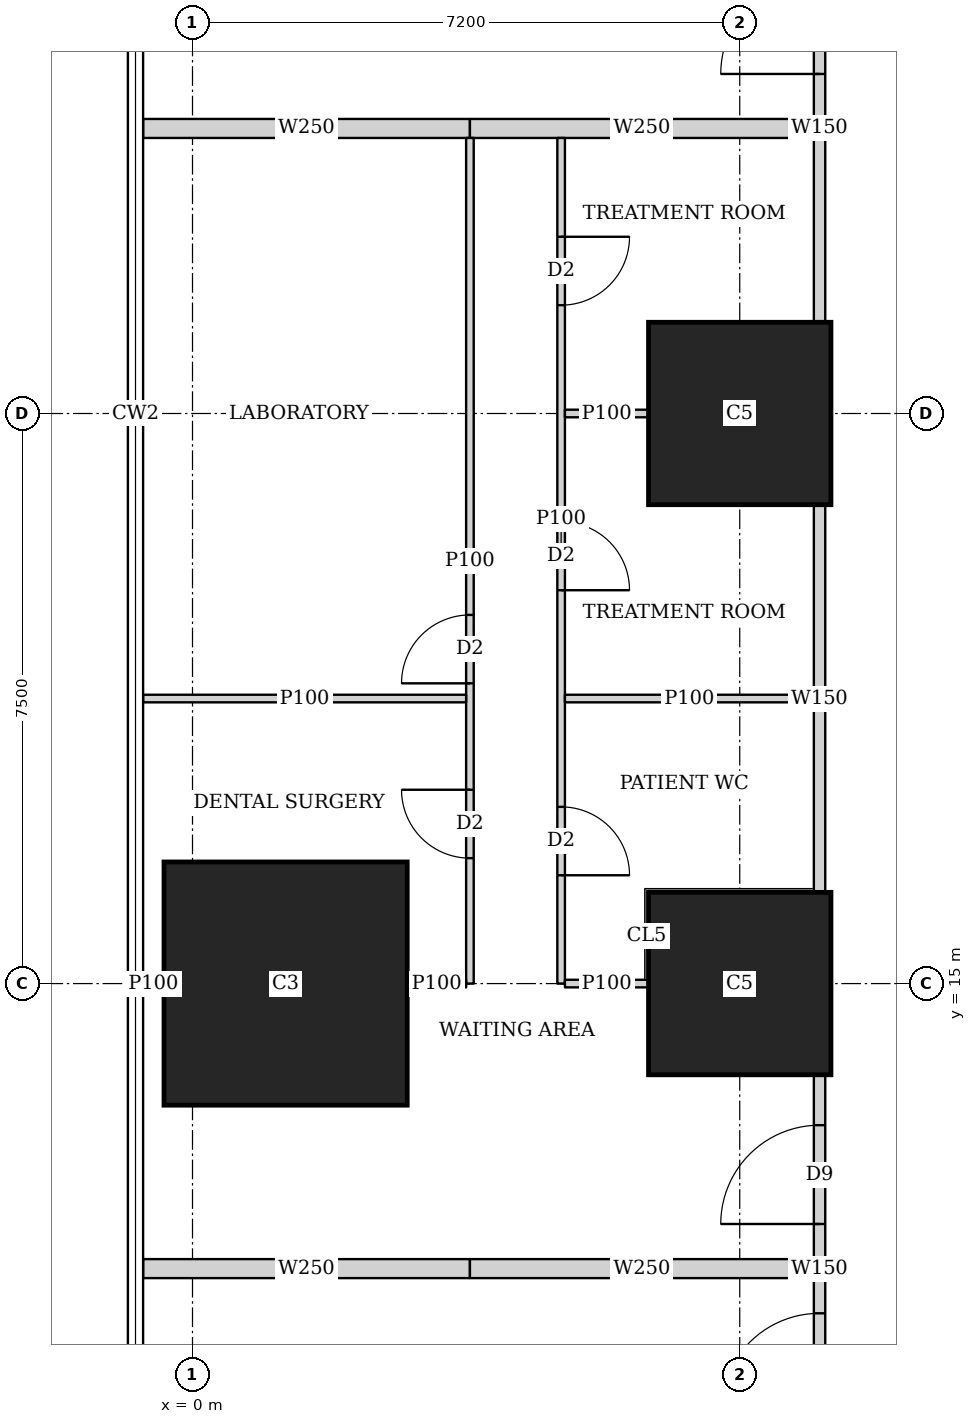
"""IFC4 building model, lengths in metres.
Left out: names, types, materials, properties, quantities, classifications, styles, units other than length and angle.
Written with IfcOpenShell. Run it as: python <this file> out.ifc"""

import sys

from ifc_helpers import new_model, si_unit, direction, frame, frame_2d, origin, origin_2d, place, context, subcontext, project, spatial, rectangle, extrude, element, fill, save


model = new_model("IFC4")
c1 = context("Model", 3, precision=1e-05, world=origin(), true_north=direction((0.0, 1.0)))
c2 = subcontext(c1, "Body", "Model", "MODEL_VIEW")
j1 = project(units=[si_unit("LENGTHUNIT", "METRE"), si_unit("PLANEANGLEUNIT", "RADIAN")], contexts=[c1])
p1 = place(None, origin())
s1 = spatial("IfcSite", under=j1, at=p1, CompositionType="ELEMENT")
p2 = place(p1, origin())
s2 = spatial("IfcBuilding", under=s1, at=p2, CompositionType="ELEMENT")
p3 = place(p2, frame((0.0, 0.0, 10.1)))
s3 = spatial("IfcBuildingStorey", under=s2, at=p3, CompositionType="ELEMENT", Elevation=10.1)
p4 = place(p3, frame((1.225, 15.0, 0.0), z_axis=(0.0, 0.0, 1.0), x_axis=(1.0, 0.0, 0.0)))
e1 = element("IfcColumn", 1, at=p4, inside=s3, PredefinedType="COLUMN", context=c2, shape_type="SweptSolid", body=[
    extrude(rectangle(XDim=3.2, YDim=3.2, at=origin_2d()), origin(), (0.0, 0.0, 1.0), 4.5),
])
for number, where, z_axis, x_axis in (
    (2, (7.2, 15.0, 0.0), (0.0, 0.0, 1.0), (1.0, 0.0, 0.0)),
    (3, (7.2, 22.5, 0.0), (0.0, 0.0, 1.0), (1.0, 0.0, 0.0)),
):
    element("IfcColumn", number, at=place(p3, frame(where, z_axis=z_axis, x_axis=x_axis)), inside=s3, PredefinedType="COLUMN", context=c2, shape_type="SweptSolid", body=[
        extrude(rectangle(XDim=2.4, YDim=2.4, at=origin_2d()), origin(), (0.0, 0.0, 1.0), 4.5),
    ])
p5 = place(p3, frame((8.25, 8.701, 0.0), z_axis=(0.0, 0.0, 1.0), x_axis=(0.0, 1.0, 0.0)))
e4 = element("IfcWall", 4, at=p5, inside=s3, PredefinedType="SOLIDWALL", context=c2, shape_type="SweptSolid", body=[
    extrude(rectangle(XDim=5.098, YDim=0.15, at=frame_2d((2.549, 0.0))), origin(), (0.0, 0.0, 1.0), 4.2),
])
p6 = place(p5, frame((0.661, 0.0, 0.0)))
e5 = element("IfcOpeningElement", 5, at=p6, cuts=e4, PredefinedType="OPENING", context=c2, shape_type="SweptSolid", body=[
    extrude(rectangle(XDim=1.3, YDim=2.1, at=frame_2d((0.65, 1.05))), frame((0.0, 0.085, 0.0), z_axis=(0.0, -1.0, 0.0), x_axis=(1.0, 0.0, 0.0)), (0.0, 0.0, 1.0), 0.17),
])
p7 = place(p5, frame((3.136, 0.0, 0.0)))
e6 = element("IfcOpeningElement", 6, at=p7, cuts=e4, PredefinedType="OPENING", context=c2, shape_type="SweptSolid", body=[
    extrude(rectangle(XDim=1.3, YDim=2.1, at=frame_2d((0.65, 1.05))), frame((0.0, 0.085, 0.0), z_axis=(0.0, -1.0, 0.0), x_axis=(1.0, 0.0, 0.0)), (0.0, 0.0, 1.0), 0.17),
])
p8 = place(p3, frame((8.25, 16.201, 0.0), z_axis=(0.0, 0.0, 1.0), x_axis=(0.0, 1.0, 0.0)))
e7 = element("IfcWall", 7, at=p8, inside=s3, PredefinedType="SOLIDWALL", context=c2, shape_type="SweptSolid", body=[
    extrude(rectangle(XDim=5.098, YDim=0.15, at=frame_2d((2.549, 0.0))), origin(), (0.0, 0.0, 1.0), 4.2),
])
p9 = place(p3, frame((8.25, 23.701, 0.0), z_axis=(0.0, 0.0, 1.0), x_axis=(0.0, 1.0, 0.0)))
e8 = element("IfcWall", 8, at=p9, inside=s3, PredefinedType="SOLIDWALL", context=c2, shape_type="SweptSolid", body=[
    extrude(rectangle(XDim=5.098, YDim=0.15, at=frame_2d((2.549, 0.0))), origin(), (0.0, 0.0, 1.0), 4.2),
])
p10 = place(p9, frame((3.266, 0.0, 0.0)))
e9 = element("IfcOpeningElement", 9, at=p10, cuts=e8, PredefinedType="OPENING", context=c2, shape_type="SweptSolid", body=[
    extrude(rectangle(XDim=1.3, YDim=2.1, at=frame_2d((0.65, 1.05))), frame((0.0, 0.085, 0.0), z_axis=(0.0, -1.0, 0.0), x_axis=(1.0, 0.0, 0.0)), (0.0, 0.0, 1.0), 0.17),
])
p11 = place(p3, frame((3.65, 15.0, 0.0), z_axis=(0.0, 0.0, 1.0), x_axis=(0.0, 1.0, 0.0)))
e10 = element("IfcWall", 10, at=p11, inside=s3, PredefinedType="PARTITIONING", context=c2, shape_type="SweptSolid", body=[
    extrude(rectangle(XDim=11.125, YDim=0.1, at=frame_2d((5.562, 0.0))), origin(), (0.0, 0.0, 1.0), 2.6),
])
p12 = place(p11, frame((1.65, 0.0, 0.0)))
e11 = element("IfcOpeningElement", 11, at=p12, cuts=e10, PredefinedType="OPENING", context=c2, shape_type="SweptSolid", body=[
    extrude(rectangle(XDim=0.9, YDim=2.1, at=frame_2d((0.45, 1.05))), frame((0.0, 0.06, 0.0), z_axis=(0.0, -1.0, 0.0), x_axis=(1.0, 0.0, 0.0)), (0.0, 0.0, 1.0), 0.12),
])
p13 = place(p11, frame((3.95, 0.0, 0.0)))
e12 = element("IfcOpeningElement", 12, at=p13, cuts=e10, PredefinedType="OPENING", context=c2, shape_type="SweptSolid", body=[
    extrude(rectangle(XDim=0.9, YDim=2.1, at=frame_2d((0.45, 1.05))), frame((0.0, 0.06, 0.0), z_axis=(0.0, -1.0, 0.0), x_axis=(1.0, 0.0, 0.0)), (0.0, 0.0, 1.0), 0.12),
])
p14 = place(p3, frame((4.85, 15.0, 0.0), z_axis=(0.0, 0.0, 1.0), x_axis=(0.0, 1.0, 0.0)))
e13 = element("IfcWall", 13, at=p14, inside=s3, PredefinedType="PARTITIONING", context=c2, shape_type="SweptSolid", body=[
    extrude(rectangle(XDim=11.125, YDim=0.1, at=frame_2d((5.562, 0.0))), origin(), (0.0, 0.0, 1.0), 2.6),
])
p15 = place(p14, frame((1.425, 0.0, 0.0)))
e14 = element("IfcOpeningElement", 14, at=p15, cuts=e13, PredefinedType="OPENING", context=c2, shape_type="SweptSolid", body=[
    extrude(rectangle(XDim=0.9, YDim=2.1, at=frame_2d((0.45, 1.05))), frame((0.0, 0.06, 0.0), z_axis=(0.0, -1.0, 0.0), x_axis=(1.0, 0.0, 0.0)), (0.0, 0.0, 1.0), 0.12),
])
p16 = place(p14, frame((5.175, 0.0, 0.0)))
e15 = element("IfcOpeningElement", 15, at=p16, cuts=e13, PredefinedType="OPENING", context=c2, shape_type="SweptSolid", body=[
    extrude(rectangle(XDim=0.9, YDim=2.1, at=frame_2d((0.45, 1.05))), frame((0.0, 0.06, 0.0), z_axis=(0.0, -1.0, 0.0), x_axis=(1.0, 0.0, 0.0)), (0.0, 0.0, 1.0), 0.12),
])
p17 = place(p14, frame((8.925, 0.0, 0.0)))
e16 = element("IfcOpeningElement", 16, at=p17, cuts=e13, PredefinedType="OPENING", context=c2, shape_type="SweptSolid", body=[
    extrude(rectangle(XDim=0.9, YDim=2.1, at=frame_2d((0.45, 1.05))), frame((0.0, 0.06, 0.0), z_axis=(0.0, -1.0, 0.0), x_axis=(1.0, 0.0, 0.0)), (0.0, 0.0, 1.0), 0.12),
])
p18 = place(p3, frame((-0.65, 15.0, 0.0), z_axis=(0.0, 0.0, 1.0), x_axis=(1.0, 0.0, 0.0)))
e17 = element("IfcWall", 17, at=p18, inside=s3, PredefinedType="PARTITIONING", context=c2, shape_type="SweptSolid", body=[
    extrude(rectangle(XDim=0.274, YDim=0.1, at=frame_2d((0.137, 0.0))), origin(), (0.0, 0.0, 1.0), 4.2),
])
p19 = place(p3, frame((2.826, 15.0, 0.0), z_axis=(0.0, 0.0, 1.0), x_axis=(1.0, 0.0, 0.0)))
e18 = element("IfcWall", 18, at=p19, inside=s3, PredefinedType="PARTITIONING", context=c2, shape_type="SweptSolid", body=[
    extrude(rectangle(XDim=0.774, YDim=0.1, at=frame_2d((0.387, 0.0))), origin(), (0.0, 0.0, 1.0), 2.6),
])
p20 = place(p3, frame((-0.65, 18.75, 0.0), z_axis=(0.0, 0.0, 1.0), x_axis=(1.0, 0.0, 0.0)))
e19 = element("IfcWall", 19, at=p20, inside=s3, PredefinedType="PARTITIONING", context=c2, shape_type="SweptSolid", body=[
    extrude(rectangle(XDim=4.25, YDim=0.1, at=frame_2d((2.125, 0.0))), origin(), (0.0, 0.0, 1.0), 2.4),
])
p21 = place(p3, frame((4.9, 15.0, 0.0), z_axis=(0.0, 0.0, 1.0), x_axis=(1.0, 0.0, 0.0)))
e20 = element("IfcWall", 20, at=p21, inside=s3, PredefinedType="PARTITIONING", context=c2, shape_type="SweptSolid", body=[
    extrude(rectangle(XDim=1.099, YDim=0.1, at=frame_2d((0.55, 0.0))), origin(), (0.0, 0.0, 1.0), 2.6),
])
p22 = place(p3, frame((4.9, 18.75, 0.0), z_axis=(0.0, 0.0, 1.0), x_axis=(1.0, 0.0, 0.0)))
e21 = element("IfcWall", 21, at=p22, inside=s3, PredefinedType="PARTITIONING", context=c2, shape_type="SweptSolid", body=[
    extrude(rectangle(XDim=3.275, YDim=0.1, at=frame_2d((1.638, 0.0))), origin(), (0.0, 0.0, 1.0), 2.6),
])
p23 = place(p3, frame((4.9, 22.5, 0.0), z_axis=(0.0, 0.0, 1.0), x_axis=(1.0, 0.0, 0.0)))
e22 = element("IfcWall", 22, at=p23, inside=s3, PredefinedType="PARTITIONING", context=c2, shape_type="SweptSolid", body=[
    extrude(rectangle(XDim=1.099, YDim=0.1, at=frame_2d((0.55, 0.0))), origin(), (0.0, 0.0, 1.0), 4.2),
])
p24 = place(p3, frame((-0.65, 11.25, 0.0), z_axis=(0.0, 0.0, 1.0), x_axis=(1.0, 0.0, 0.0)))
e23 = element("IfcWall", 23, at=p24, inside=s3, PredefinedType="SOLIDWALL", context=c2, shape_type="SweptSolid", body=[
    extrude(rectangle(XDim=4.3, YDim=0.25, at=frame_2d((2.15, 0.0))), origin(), (0.0, 0.0, 1.0), 2.4),
])
p25 = place(p3, frame((3.65, 11.25, 0.0), z_axis=(0.0, 0.0, 1.0), x_axis=(1.0, 0.0, 0.0)))
e24 = element("IfcWall", 24, at=p25, inside=s3, PredefinedType="SOLIDWALL", context=c2, shape_type="SweptSolid", body=[
    extrude(rectangle(XDim=4.525, YDim=0.25, at=frame_2d((2.263, 0.0))), origin(), (0.0, 0.0, 1.0), 2.6),
])
p26 = place(p3, frame((-0.65, 26.25, 0.0), z_axis=(0.0, 0.0, 1.0), x_axis=(1.0, 0.0, 0.0)))
e25 = element("IfcWall", 25, at=p26, inside=s3, PredefinedType="SOLIDWALL", context=c2, shape_type="SweptSolid", body=[
    extrude(rectangle(XDim=4.3, YDim=0.25, at=frame_2d((2.15, 0.0))), origin(), (0.0, 0.0, 1.0), 2.4),
])
p27 = place(p3, frame((3.65, 26.25, 0.0), z_axis=(0.0, 0.0, 1.0), x_axis=(1.0, 0.0, 0.0)))
e26 = element("IfcWall", 26, at=p27, inside=s3, PredefinedType="SOLIDWALL", context=c2, shape_type="SweptSolid", body=[
    extrude(rectangle(XDim=4.525, YDim=0.25, at=frame_2d((2.263, 0.0))), origin(), (0.0, 0.0, 1.0), 2.6),
])
p28 = place(p6, origin())
e27 = element("IfcDoor", 27, at=p28, inside=s3, OperationType="DOUBLE_DOOR_SINGLE_SWING", PredefinedType="DOOR", context=c2, shape_type="SweptSolid", body=[
    extrude(rectangle(XDim=1.3, YDim=2.1, at=frame_2d((0.65, 1.05))), frame((0.0, 0.025, 0.0), z_axis=(0.0, -1.0, 0.0), x_axis=(1.0, 0.0, 0.0)), (0.0, 0.0, 1.0), 0.05),
])
fill(e5, e27)
p29 = place(p12, origin())
e28 = element("IfcDoor", 28, at=p29, inside=s3, OperationType="SINGLE_SWING_RIGHT", PredefinedType="DOOR", context=c2, shape_type="SweptSolid", body=[
    extrude(rectangle(XDim=0.9, YDim=2.1, at=frame_2d((0.45, 1.05))), frame((0.0, 0.025, 0.0), z_axis=(0.0, -1.0, 0.0), x_axis=(1.0, 0.0, 0.0)), (0.0, 0.0, 1.0), 0.05),
])
fill(e11, e28)
p30 = place(p13, origin())
e29 = element("IfcDoor", 29, at=p30, inside=s3, OperationType="SINGLE_SWING_LEFT", PredefinedType="DOOR", context=c2, shape_type="SweptSolid", body=[
    extrude(rectangle(XDim=0.9, YDim=2.1, at=frame_2d((0.45, 1.05))), frame((0.0, 0.025, 0.0), z_axis=(0.0, -1.0, 0.0), x_axis=(1.0, 0.0, 0.0)), (0.0, 0.0, 1.0), 0.05),
])
fill(e12, e29)
p31 = place(p15, origin())
e30 = element("IfcDoor", 30, at=p31, inside=s3, OperationType="SINGLE_SWING_RIGHT", PredefinedType="DOOR", context=c2, shape_type="SweptSolid", body=[
    extrude(rectangle(XDim=0.9, YDim=2.1, at=frame_2d((0.45, 1.05))), frame((0.0, 0.025, 0.0), z_axis=(0.0, -1.0, 0.0), x_axis=(1.0, 0.0, 0.0)), (0.0, 0.0, 1.0), 0.05),
])
fill(e14, e30)
p32 = place(p16, origin())
e31 = element("IfcDoor", 31, at=p32, inside=s3, OperationType="SINGLE_SWING_RIGHT", PredefinedType="DOOR", context=c2, shape_type="SweptSolid", body=[
    extrude(rectangle(XDim=0.9, YDim=2.1, at=frame_2d((0.45, 1.05))), frame((0.0, 0.025, 0.0), z_axis=(0.0, -1.0, 0.0), x_axis=(1.0, 0.0, 0.0)), (0.0, 0.0, 1.0), 0.05),
])
fill(e15, e31)
p33 = place(p17, origin())
e32 = element("IfcDoor", 32, at=p33, inside=s3, OperationType="SINGLE_SWING_LEFT", PredefinedType="DOOR", context=c2, shape_type="SweptSolid", body=[
    extrude(rectangle(XDim=0.9, YDim=2.1, at=frame_2d((0.45, 1.05))), frame((0.0, 0.025, 0.0), z_axis=(0.0, -1.0, 0.0), x_axis=(1.0, 0.0, 0.0)), (0.0, 0.0, 1.0), 0.05),
])
fill(e16, e32)
p34 = place(p7, origin())
e33 = element("IfcDoor", 33, at=p34, inside=s3, OperationType="DOUBLE_DOOR_SINGLE_SWING", PredefinedType="DOOR", context=c2, shape_type="SweptSolid", body=[
    extrude(rectangle(XDim=1.3, YDim=2.1, at=frame_2d((0.65, 1.05))), frame((0.0, 0.025, 0.0), z_axis=(0.0, -1.0, 0.0), x_axis=(1.0, 0.0, 0.0)), (0.0, 0.0, 1.0), 0.05),
])
fill(e6, e33)
p35 = place(p10, origin())
e34 = element("IfcDoor", 34, at=p35, inside=s3, OperationType="DOUBLE_DOOR_SINGLE_SWING", PredefinedType="DOOR", context=c2, shape_type="SweptSolid", body=[
    extrude(rectangle(XDim=1.3, YDim=2.1, at=frame_2d((0.65, 1.05))), frame((0.0, 0.025, 0.0), z_axis=(0.0, -1.0, 0.0), x_axis=(1.0, 0.0, 0.0)), (0.0, 0.0, 1.0), 0.05),
])
fill(e9, e34)
save(model, sys.argv[1])
